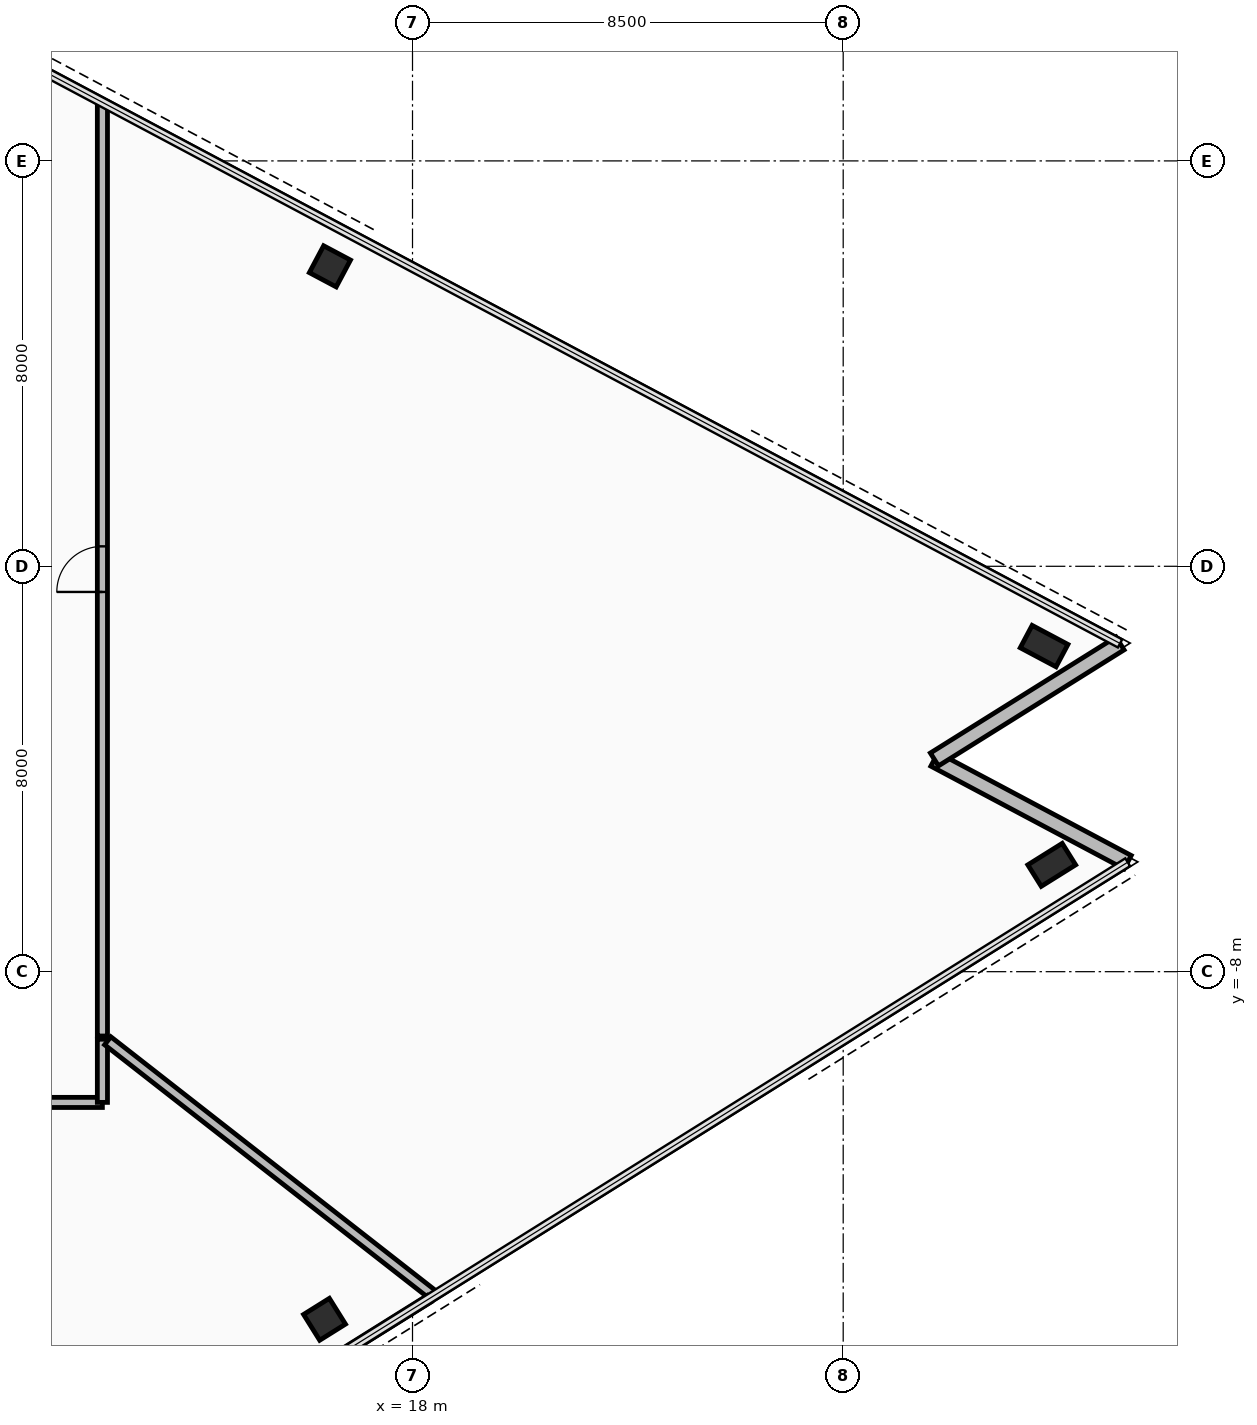
"""IFC4 building model, lengths in metres.
Left out: names, types, materials, properties, quantities, classifications, styles, units other than length and angle.
Written with IfcOpenShell. Run it as: python <this file> out.ifc"""

import sys

from ifc_helpers import new_model, si_unit, direction, frame, frame_2d, origin, origin_2d, place, context, subcontext, project, spatial, rectangle, hollow_rectangle, extrude, element, fill, save


model = new_model("IFC4")
c1 = context("Model", 3, precision=1e-05, world=origin(), true_north=direction((0.0, 1.0)))
c2 = subcontext(c1, "Body", "Model", "MODEL_VIEW")
j1 = project(units=[si_unit("LENGTHUNIT", "METRE"), si_unit("PLANEANGLEUNIT", "RADIAN")], contexts=[c1])
p1 = place(None, origin())
s1 = spatial("IfcSite", under=j1, at=p1, CompositionType="ELEMENT")
p2 = place(p1, origin())
s2 = spatial("IfcBuilding", under=s1, at=p2, CompositionType="ELEMENT")
p3 = place(p2, frame((0.0, 0.0, 160.4)))
s3 = spatial("IfcBuildingStorey", under=s2, at=p3, CompositionType="ELEMENT", Elevation=160.4)
p4 = place(p3, frame((16.264, -14.86, 0.0), z_axis=(0.0, 0.0, 1.0), x_axis=(0.848047171272, 0.529920744356, 0.0)))
e1 = element("IfcColumn", 1, at=p4, inside=s3, PredefinedType="COLUMN", context=c2, shape_type="SweptSolid", body=[
    extrude(hollow_rectangle(XDim=0.6, YDim=0.6, WallThickness=0.036, at=origin_2d()), origin(), (0.0, 0.0, 1.0), 4.75),
])
for number, where, z_axis, x_axis in (
    (2, (30.615, -5.892, 0.0), (0.0, 0.0, 1.0), (0.848, 0.53, 0.0)),
    (3, (30.465, -1.575, 0.0), (0.0, 0.0, 1.0), (-0.883, 0.469, 0.0)),
):
    element("IfcColumn", number, at=place(p3, frame(where, z_axis=z_axis, x_axis=x_axis)), inside=s3, PredefinedType="COLUMN", context=c2, shape_type="SweptSolid", body=[
        extrude(hollow_rectangle(XDim=0.5, YDim=0.8, WallThickness=0.04, at=origin_2d()), origin(), (0.0, 0.0, 1.0), 4.75),
    ])
p5 = place(p3, frame((16.37, 5.919, 0.0), z_axis=(0.0, 0.0, 1.0), x_axis=(-0.88294841224, 0.469470021751, 0.0)))
e4 = element("IfcColumn", 4, at=p5, inside=s3, PredefinedType="COLUMN", context=c2, shape_type="SweptSolid", body=[
    extrude(hollow_rectangle(XDim=0.6, YDim=0.6, WallThickness=0.036, at=origin_2d()), origin(), (0.0, 0.0, 1.0), 4.75),
])
p6 = place(p3, frame((32.115, -5.84, 0.0), z_axis=(0.0, 0.0, 1.0), x_axis=(-0.882945167019, 0.469476125099, 0.0)))
e5 = element("IfcWall", 5, at=p6, inside=s3, PredefinedType="STANDARD", context=c2, shape_type="SweptSolid", body=[
    extrude(rectangle(XDim=4.32, YDim=0.3, at=frame_2d((2.16, 0.0))), origin(), (0.0, 0.0, 1.0), 2.25),
])
p7 = place(p3, frame((28.3, -3.812, 0.0), z_axis=(0.0, 0.0, 1.0), x_axis=(0.848042749904, 0.529927819929, 0.0)))
e6 = element("IfcWall", 6, at=p7, inside=s3, PredefinedType="STANDARD", context=c2, shape_type="SweptSolid", body=[
    extrude(rectangle(XDim=4.32, YDim=0.3, at=frame_2d((2.16, 0.0))), origin(), (0.0, 0.0, 1.0), 2.25),
])
p8 = place(p3, frame((-7.123, -10.58, 0.0), z_axis=(0.0, 0.0, 1.0), x_axis=(1.0, 0.0, 0.0)))
e7 = element("IfcWall", 7, at=p8, inside=s3, PredefinedType="PARTITIONING", context=c2, shape_type="SweptSolid", body=[
    extrude(rectangle(XDim=19.002, YDim=0.2, at=frame_2d((9.501, 0.0))), origin(), (0.0, 0.0, 1.0), 2.35),
])
p9 = place(p8, frame((9.076, 0.0, 0.0)))
e8 = element("IfcOpeningElement", 8, at=p9, cuts=e7, PredefinedType="OPENING", context=c2, shape_type="SweptSolid", body=[
    extrude(rectangle(XDim=0.85, YDim=2.1, at=frame_2d((0.425, 1.05))), frame((0.0, 0.11, 0.0), z_axis=(0.0, -1.0, 0.0), x_axis=(1.0, 0.0, 0.0)), (0.0, 0.0, 1.0), 0.22),
])
p10 = place(p3, frame((11.88, -10.579, 0.0), z_axis=(0.0, 0.0, 1.0), x_axis=(0.0, 1.0, 0.0)))
e9 = element("IfcWall", 9, at=p10, inside=s3, PredefinedType="PARTITIONING", context=c2, shape_type="SweptSolid", body=[
    extrude(rectangle(XDim=1.246, YDim=0.2, at=frame_2d((0.623, 0.0))), origin(), (0.0, 0.0, 1.0), 2.75),
])
p11 = place(p3, frame((11.985, -9.364, 0.0), z_axis=(0.0, 0.0, 1.0), x_axis=(0.7880166733, -0.615653898389, 0.0)))
e10 = element("IfcWall", 10, at=p11, inside=s3, PredefinedType="PARTITIONING", context=c2, shape_type="SweptSolid", body=[
    extrude(rectangle(XDim=8.171, YDim=0.2, at=frame_2d((4.086, 0.0))), origin(), (0.0, 0.0, 1.0), 2.25),
])
p12 = place(p3, frame((18.33, -14.454, 0.0), z_axis=(0.0, 0.0, 1.0), x_axis=(-0.848050291152, -0.52991575149, 0.0)))
e11 = element("IfcWall", 11, at=p12, inside=s3, PredefinedType="PARTITIONING", context=c2, shape_type="SweptSolid", body=[
    extrude(rectangle(XDim=36.933, YDim=0.15, at=frame_2d((18.467, 0.0))), origin(), (0.0, 0.0, 1.0), 2.35),
])
p13 = place(p3, frame((11.88, -9.27, 0.0), z_axis=(0.0, 0.0, 1.0), x_axis=(0.0, 1.0, 0.0)))
e12 = element("IfcWall", 12, at=p13, inside=s3, PredefinedType="PARTITIONING", context=c2, shape_type="SweptSolid", body=[
    extrude(rectangle(XDim=18.426, YDim=0.2, at=frame_2d((9.213, 0.0))), origin(), (0.0, 0.0, 1.0), 2.25),
])
p14 = place(p13, frame((8.763, 0.0, 0.0)))
e13 = element("IfcOpeningElement", 13, at=p14, cuts=e12, PredefinedType="OPENING", context=c2, shape_type="SweptSolid", body=[
    extrude(rectangle(XDim=0.9, YDim=2.1, at=frame_2d((0.45, 1.05))), frame((0.0, 0.11, 0.0), z_axis=(0.0, -1.0, 0.0), x_axis=(1.0, 0.0, 0.0)), (0.0, 0.0, 1.0), 0.22),
])
p15 = place(p14, origin())
e14 = element("IfcDoor", 14, at=p15, inside=s3, OperationType="SINGLE_SWING_LEFT", PredefinedType="DOOR", context=c2, shape_type="SweptSolid", body=[
    extrude(rectangle(XDim=0.9, YDim=2.1, at=frame_2d((0.45, 1.05))), frame((0.0, 0.025, 0.0), z_axis=(0.0, -1.0, 0.0), x_axis=(1.0, 0.0, 0.0)), (0.0, 0.0, 1.0), 0.05),
])
fill(e13, e14)
save(model, sys.argv[1])
